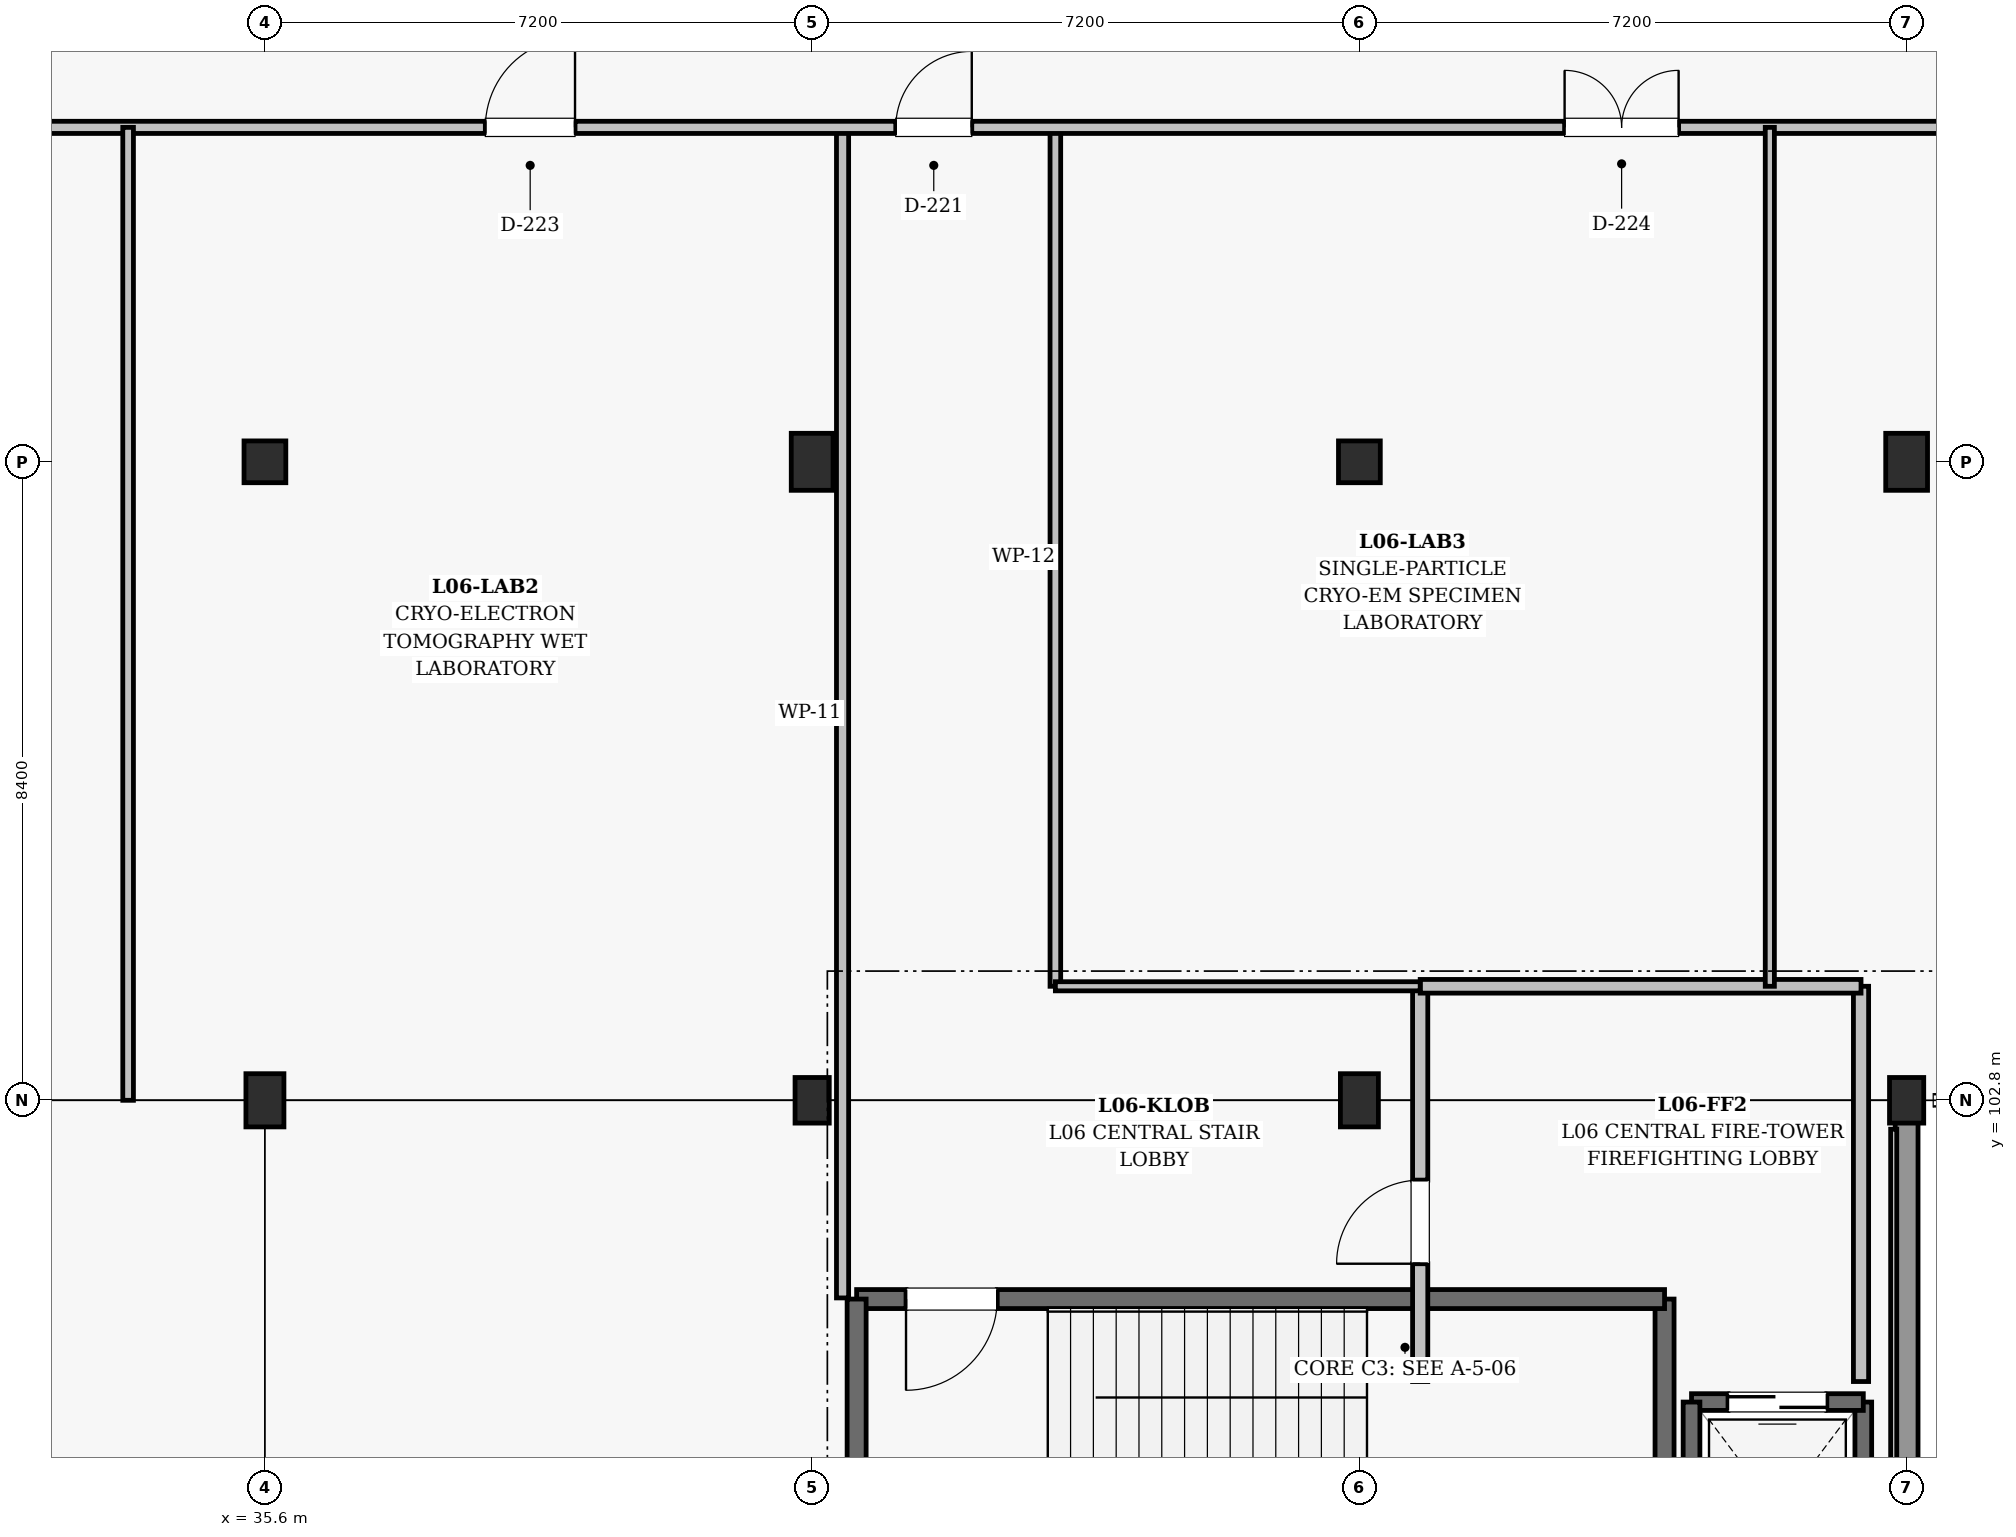
"""IFC4 building model, lengths in metres.
Left out: names, types, materials, properties, quantities, classifications, styles, units other than length and angle.
Written with IfcOpenShell. Run it as: python <this file> out.ifc"""

import sys

from ifc_helpers import new_model, si_unit, direction, frame, frame_2d, origin, origin_2d, place, context, subcontext, project, spatial, rectangle, extrude, element, fill, save


model = new_model("IFC4")
c1 = context("Model", 3, precision=1e-05, world=origin(), true_north=direction((0.0, 1.0)))
c2 = subcontext(c1, "Body", "Model", "MODEL_VIEW")
j1 = project(units=[si_unit("LENGTHUNIT", "METRE"), si_unit("PLANEANGLEUNIT", "RADIAN")], contexts=[c1])
p1 = place(None, origin())
s1 = spatial("IfcSite", under=j1, at=p1, CompositionType="ELEMENT")
p2 = place(p1, origin())
s2 = spatial("IfcBuilding", under=s1, at=p2, CompositionType="ELEMENT")
p3 = place(p2, frame((0.0, 0.0, 27.9)))
s3 = spatial("IfcBuildingStorey", under=s2, at=p3, CompositionType="ELEMENT", Elevation=27.9)
p4 = place(p3, frame((35.6, 102.8, 0.0), z_axis=(0.0, 0.0, 1.0), x_axis=(1.0, 0.0, 0.0)))
e1 = element("IfcColumn", 1, at=p4, inside=s3, PredefinedType="COLUMN", context=c2, shape_type="SweptSolid", body=[
    extrude(rectangle(XDim=0.5, YDim=0.7, at=origin_2d()), origin(), (0.0, 0.0, 1.0), 4.5),
])
p5 = place(p3, frame((35.6, 111.2, 0.0), z_axis=(0.0, 0.0, 1.0), x_axis=(1.0, 0.0, 0.0)))
e2 = element("IfcColumn", 2, at=p5, inside=s3, PredefinedType="COLUMN", context=c2, shape_type="SweptSolid", body=[
    extrude(rectangle(XDim=0.55, YDim=0.55, at=origin_2d()), origin(), (0.0, 0.0, 1.0), 4.5),
])
p6 = place(p3, frame((42.8, 102.8, 0.0), z_axis=(0.0, 0.0, 1.0), x_axis=(1.0, 0.0, 0.0)))
e3 = element("IfcColumn", 3, at=p6, inside=s3, PredefinedType="COLUMN", context=c2, shape_type="SweptSolid", body=[
    extrude(rectangle(XDim=0.45, YDim=0.6, at=origin_2d()), origin(), (0.0, 0.0, 1.0), 4.5),
])
p7 = place(p3, frame((42.8, 111.2, 0.0), z_axis=(0.0, 0.0, 1.0), x_axis=(1.0, 0.0, 0.0)))
e4 = element("IfcColumn", 4, at=p7, inside=s3, PredefinedType="COLUMN", context=c2, shape_type="SweptSolid", body=[
    extrude(rectangle(XDim=0.55, YDim=0.75, at=origin_2d()), origin(), (0.0, 0.0, 1.0), 4.5),
])
p8 = place(p3, frame((50.0, 102.8, 0.0), z_axis=(0.0, 0.0, 1.0), x_axis=(1.0, 0.0, 0.0)))
e5 = element("IfcColumn", 5, at=p8, inside=s3, PredefinedType="COLUMN", context=c2, shape_type="SweptSolid", body=[
    extrude(rectangle(XDim=0.5, YDim=0.7, at=origin_2d()), origin(), (0.0, 0.0, 1.0), 4.5),
])
p9 = place(p3, frame((50.0, 111.2, 0.0), z_axis=(0.0, 0.0, 1.0), x_axis=(1.0, 0.0, 0.0)))
e6 = element("IfcColumn", 6, at=p9, inside=s3, PredefinedType="COLUMN", context=c2, shape_type="SweptSolid", body=[
    extrude(rectangle(XDim=0.55, YDim=0.55, at=origin_2d()), origin(), (0.0, 0.0, 1.0), 4.5),
])
p10 = place(p3, frame((57.2, 102.8, 0.0), z_axis=(0.0, 0.0, 1.0), x_axis=(1.0, 0.0, 0.0)))
e7 = element("IfcColumn", 7, at=p10, inside=s3, PredefinedType="COLUMN", context=c2, shape_type="SweptSolid", body=[
    extrude(rectangle(XDim=0.45, YDim=0.6, at=origin_2d()), origin(), (0.0, 0.0, 1.0), 4.5),
])
p11 = place(p3, frame((57.2, 111.2, 0.0), z_axis=(0.0, 0.0, 1.0), x_axis=(1.0, 0.0, 0.0)))
e8 = element("IfcColumn", 8, at=p11, inside=s3, PredefinedType="COLUMN", context=c2, shape_type="SweptSolid", body=[
    extrude(rectangle(XDim=0.55, YDim=0.75, at=origin_2d()), origin(), (0.0, 0.0, 1.0), 4.5),
])
p12 = place(p3, frame((57.2, 94.655, 0.0), z_axis=(0.0, 0.0, 1.0), x_axis=(0.0, 1.0, 0.0)))
e9 = element("IfcWall", 9, at=p12, inside=s3, PredefinedType="SOLIDWALL", context=c2, shape_type="SweptSolid", body=[
    extrude(rectangle(XDim=7.865, YDim=0.3, at=frame_2d((3.933, 0.0))), origin(), (0.0, 0.0, 1.0), 3.355),
])
p13 = place(p3, frame((54.015, 95.085, 0.0), z_axis=(0.0, 0.0, 1.0), x_axis=(0.0, 1.0, 0.0)))
e10 = element("IfcWall", 10, at=p13, inside=s3, PredefinedType="SHEAR", context=c2, shape_type="SweptSolid", body=[
    extrude(rectangle(XDim=5.1, YDim=0.25, at=frame_2d((2.55, 0.0))), origin(), (0.0, 0.0, 1.0), 4.175),
])
p14 = place(p3, frame((54.015, 100.185, 0.0), z_axis=(0.0, 0.0, 1.0), x_axis=(-1.0, 0.0, 0.0)))
e11 = element("IfcWall", 11, at=p14, inside=s3, PredefinedType="SHEAR", context=c2, shape_type="SweptSolid", body=[
    extrude(rectangle(XDim=10.63, YDim=0.25, at=frame_2d((5.315, 0.0))), origin(), (0.0, 0.0, 1.0), 4.175),
])
p15 = place(p14, frame((8.78, 0.0, 0.0)))
e12 = element("IfcOpeningElement", 12, at=p15, cuts=e11, PredefinedType="OPENING", context=c2, shape_type="SweptSolid", body=[
    extrude(rectangle(XDim=1.2, YDim=2.15, at=frame_2d((0.6, 1.075))), frame((0.0, 0.135, 0.0), z_axis=(0.0, -1.0, 0.0), x_axis=(1.0, 0.0, 0.0)), (0.0, 0.0, 1.0), 0.27),
])
p16 = place(p3, frame((43.385, 100.185, 0.0), z_axis=(0.0, 0.0, 1.0), x_axis=(0.0, -1.0, 0.0)))
e13 = element("IfcWall", 13, at=p16, inside=s3, PredefinedType="SHEAR", context=c2, shape_type="SweptSolid", body=[
    extrude(rectangle(XDim=5.1, YDim=0.25, at=frame_2d((2.55, 0.0))), origin(), (0.0, 0.0, 1.0), 4.175),
])
p17 = place(p3, frame((56.63, 95.97, 0.0), z_axis=(0.0, 0.0, 1.0), x_axis=(0.0, 1.0, 0.0)))
e14 = element("IfcWall", 14, at=p17, inside=s3, PredefinedType="SHEAR", context=c2, shape_type="SweptSolid", body=[
    extrude(rectangle(XDim=2.86, YDim=0.22, at=frame_2d((1.43, 0.0))), origin(), (0.0, 0.0, 1.0), 4.175),
])
p18 = place(p3, frame((56.63, 98.83, 0.0), z_axis=(0.0, 0.0, 1.0), x_axis=(-1.0, 0.0, 0.0)))
e15 = element("IfcWall", 15, at=p18, inside=s3, PredefinedType="SHEAR", context=c2, shape_type="SweptSolid", body=[
    extrude(rectangle(XDim=2.26, YDim=0.22, at=frame_2d((1.13, 0.0))), origin(), (0.0, 0.0, 1.0), 4.175),
])
p19 = place(p18, frame((0.48, 0.0, 0.0)))
e16 = element("IfcOpeningElement", 16, at=p19, cuts=e15, PredefinedType="OPENING", context=c2, shape_type="SweptSolid", body=[
    extrude(rectangle(XDim=1.3, YDim=2.2, at=frame_2d((0.65, 1.1))), frame((0.0, 0.12, 0.0), z_axis=(0.0, -1.0, 0.0), x_axis=(1.0, 0.0, 0.0)), (0.0, 0.0, 1.0), 0.24),
])
p20 = place(p3, frame((54.37, 98.83, 0.0), z_axis=(0.0, 0.0, 1.0), x_axis=(0.0, -1.0, 0.0)))
e17 = element("IfcWall", 17, at=p20, inside=s3, PredefinedType="SHEAR", context=c2, shape_type="SweptSolid", body=[
    extrude(rectangle(XDim=2.86, YDim=0.22, at=frame_2d((1.43, 0.0))), origin(), (0.0, 0.0, 1.0), 4.175),
])
p21 = place(p3, frame((50.8, 99.1, 0.0), z_axis=(0.0, 0.0, 1.0), x_axis=(0.0, 1.0, 0.0)))
e18 = element("IfcWall", 18, at=p21, inside=s3, PredefinedType="SOLIDWALL", context=c2, shape_type="SweptSolid", body=[
    extrude(rectangle(XDim=5.2, YDim=0.2, at=frame_2d((2.6, 0.0))), origin(), (0.0, 0.0, 1.0), 3.36),
])
p22 = place(p21, frame((1.55, 0.0, 0.0)))
e19 = element("IfcOpeningElement", 19, at=p22, cuts=e18, PredefinedType="OPENING", context=c2, shape_type="SweptSolid", body=[
    extrude(rectangle(XDim=1.1, YDim=2.15, at=frame_2d((0.55, 1.075))), frame((0.0, 0.11, 0.0), z_axis=(0.0, -1.0, 0.0), x_axis=(1.0, 0.0, 0.0)), (0.0, 0.0, 1.0), 0.22),
])
p23 = place(p3, frame((56.6, 99.1, 0.0), z_axis=(0.0, 0.0, 1.0), x_axis=(0.0, 1.0, 0.0)))
e20 = element("IfcWall", 20, at=p23, inside=s3, PredefinedType="SOLIDWALL", context=c2, shape_type="SweptSolid", body=[
    extrude(rectangle(XDim=5.2, YDim=0.2, at=frame_2d((2.6, 0.0))), origin(), (0.0, 0.0, 1.0), 3.36),
])
p24 = place(p3, frame((50.8, 104.3, 0.0), z_axis=(0.0, 0.0, 1.0), x_axis=(1.0, 0.0, 0.0)))
e21 = element("IfcWall", 21, at=p24, inside=s3, PredefinedType="SOLIDWALL", context=c2, shape_type="SweptSolid", body=[
    extrude(rectangle(XDim=5.8, YDim=0.18, at=frame_2d((2.9, 0.0))), origin(), (0.0, 0.0, 1.0), 3.56),
])
p25 = place(p3, frame((43.2, 100.2, 0.0), z_axis=(0.0, 0.0, 1.0), x_axis=(0.0, 1.0, 0.0)))
e22 = element("IfcWall", 22, at=p25, inside=s3, PredefinedType="PARTITIONING", context=c2, shape_type="SweptSolid", body=[
    extrude(rectangle(XDim=15.4, YDim=0.16, at=frame_2d((7.7, 0.0))), origin(), (0.0, 0.0, 1.0), 2.96),
])
p26 = place(p3, frame((46.0, 104.3, 0.0), z_axis=(0.0, 0.0, 1.0), x_axis=(0.0, 1.0, 0.0)))
e23 = element("IfcWall", 23, at=p26, inside=s3, PredefinedType="PARTITIONING", context=c2, shape_type="SweptSolid", body=[
    extrude(rectangle(XDim=11.3, YDim=0.14, at=frame_2d((5.65, 0.0))), origin(), (0.0, 0.0, 1.0), 3.52),
])
p27 = place(p3, frame((46.0, 104.3, 0.0), z_axis=(0.0, 0.0, 1.0), x_axis=(1.0, 0.0, 0.0)))
e24 = element("IfcWall", 24, at=p27, inside=s3, PredefinedType="PARTITIONING", context=c2, shape_type="SweptSolid", body=[
    extrude(rectangle(XDim=4.8, YDim=0.12, at=frame_2d((2.4, 0.0))), origin(), (0.0, 0.0, 1.0), 3.31),
])
p28 = place(p3, frame((14.0, 115.6, 0.0), z_axis=(0.0, 0.0, 1.0), x_axis=(1.0, 0.0, 0.0)))
e25 = element("IfcWall", 25, at=p28, inside=s3, PredefinedType="PARTITIONING", context=c2, shape_type="SweptSolid", body=[
    extrude(rectangle(XDim=93.6, YDim=0.16, at=frame_2d((46.8, 0.0))), origin(), (0.0, 0.0, 1.0), 2.96),
])
p29 = place(p28, frame((29.9, 0.0, 0.0)))
e26 = element("IfcOpeningElement", 26, at=p29, cuts=e25, PredefinedType="OPENING", context=c2, shape_type="SweptSolid", body=[
    extrude(rectangle(XDim=1.0, YDim=2.15, at=frame_2d((0.5, 1.075))), frame((0.0, 0.09, 0.0), z_axis=(0.0, -1.0, 0.0), x_axis=(1.0, 0.0, 0.0)), (0.0, 0.0, 1.0), 0.18),
])
p30 = place(p28, frame((10.1, 0.0, 0.0)))
e27 = element("IfcOpeningElement", 27, at=p30, cuts=e25, PredefinedType="OPENING", context=c2, shape_type="SweptSolid", body=[
    extrude(rectangle(XDim=1.5, YDim=2.25, at=frame_2d((0.75, 1.125))), frame((0.0, 0.09, 0.0), z_axis=(0.0, -1.0, 0.0), x_axis=(1.0, 0.0, 0.0)), (0.0, 0.0, 1.0), 0.18),
])
p31 = place(p28, frame((24.5, 0.0, 0.0)))
e28 = element("IfcOpeningElement", 28, at=p31, cuts=e25, PredefinedType="OPENING", context=c2, shape_type="SweptSolid", body=[
    extrude(rectangle(XDim=1.18, YDim=2.2, at=frame_2d((0.59, 1.1))), frame((0.0, 0.09, 0.0), z_axis=(0.0, -1.0, 0.0), x_axis=(1.0, 0.0, 0.0)), (0.0, 0.0, 1.0), 0.18),
])
p32 = place(p28, frame((38.7, 0.0, 0.0)))
e29 = element("IfcOpeningElement", 29, at=p32, cuts=e25, PredefinedType="OPENING", context=c2, shape_type="SweptSolid", body=[
    extrude(rectangle(XDim=1.5, YDim=2.25, at=frame_2d((0.75, 1.125))), frame((0.0, 0.09, 0.0), z_axis=(0.0, -1.0, 0.0), x_axis=(1.0, 0.0, 0.0)), (0.0, 0.0, 1.0), 0.18),
])
p33 = place(p28, frame((52.4, 0.0, 0.0)))
e30 = element("IfcOpeningElement", 30, at=p33, cuts=e25, PredefinedType="OPENING", context=c2, shape_type="SweptSolid", body=[
    extrude(rectangle(XDim=1.5, YDim=2.25, at=frame_2d((0.75, 1.125))), frame((0.0, 0.09, 0.0), z_axis=(0.0, -1.0, 0.0), x_axis=(1.0, 0.0, 0.0)), (0.0, 0.0, 1.0), 0.18),
])
p34 = place(p28, frame((69.3, 0.0, 0.0)))
e31 = element("IfcOpeningElement", 31, at=p34, cuts=e25, PredefinedType="OPENING", context=c2, shape_type="SweptSolid", body=[
    extrude(rectangle(XDim=1.5, YDim=2.25, at=frame_2d((0.75, 1.125))), frame((0.0, 0.09, 0.0), z_axis=(0.0, -1.0, 0.0), x_axis=(1.0, 0.0, 0.0)), (0.0, 0.0, 1.0), 0.18),
])
p35 = place(p28, frame((88.2, 0.0, 0.0)))
e32 = element("IfcOpeningElement", 32, at=p35, cuts=e25, PredefinedType="OPENING", context=c2, shape_type="SweptSolid", body=[
    extrude(rectangle(XDim=1.6, YDim=2.25, at=frame_2d((0.8, 1.125))), frame((0.0, 0.09, 0.0), z_axis=(0.0, -1.0, 0.0), x_axis=(1.0, 0.0, 0.0)), (0.0, 0.0, 1.0), 0.18),
])
p36 = place(p3, frame((33.8, 102.8, 0.0), z_axis=(0.0, 0.0, 1.0), x_axis=(0.0, 1.0, 0.0)))
e33 = element("IfcWall", 33, at=p36, inside=s3, PredefinedType="PARTITIONING", context=c2, shape_type="SweptSolid", body=[
    extrude(rectangle(XDim=12.8, YDim=0.14, at=frame_2d((6.4, 0.0))), origin(), (0.0, 0.0, 1.0), 3.41),
])
p37 = place(p3, frame((55.4, 104.3, 0.0), z_axis=(0.0, 0.0, 1.0), x_axis=(0.0, 1.0, 0.0)))
e34 = element("IfcWall", 34, at=p37, inside=s3, PredefinedType="PARTITIONING", context=c2, shape_type="SweptSolid", body=[
    extrude(rectangle(XDim=11.3, YDim=0.12, at=frame_2d((5.65, 0.0))), origin(), (0.0, 0.0, 1.0), 3.44),
])
p38 = place(p15, origin())
e35 = element("IfcDoor", 35, at=p38, inside=s3, OperationType="SINGLE_SWING_RIGHT", PredefinedType="DOOR", context=c2, shape_type="SweptSolid", body=[
    extrude(rectangle(XDim=1.2, YDim=2.15, at=frame_2d((0.6, 1.075))), frame((0.0, 0.025, 0.0), z_axis=(0.0, -1.0, 0.0), x_axis=(1.0, 0.0, 0.0)), (0.0, 0.0, 1.0), 0.05),
])
fill(e12, e35)
p39 = place(p19, origin())
e36 = element("IfcDoor", 36, at=p39, inside=s3, OperationType="DOUBLE_DOOR_SLIDING", PredefinedType="DOOR", context=c2, shape_type="SweptSolid", body=[
    extrude(rectangle(XDim=1.3, YDim=2.2, at=frame_2d((0.65, 1.1))), frame((0.0, 0.025, 0.0), z_axis=(0.0, -1.0, 0.0), x_axis=(1.0, 0.0, 0.0)), (0.0, 0.0, 1.0), 0.05),
])
fill(e16, e36)
p40 = place(p22, origin())
e37 = element("IfcDoor", 37, at=p40, inside=s3, OperationType="SINGLE_SWING_LEFT", PredefinedType="DOOR", context=c2, shape_type="SweptSolid", body=[
    extrude(rectangle(XDim=1.1, YDim=2.15, at=frame_2d((0.55, 1.075))), frame((0.0, 0.025, 0.0), z_axis=(0.0, -1.0, 0.0), x_axis=(1.0, 0.0, 0.0)), (0.0, 0.0, 1.0), 0.05),
])
fill(e19, e37)
p41 = place(p29, origin())
e38 = element("IfcDoor", 38, at=p41, inside=s3, OperationType="SINGLE_SWING_RIGHT", PredefinedType="DOOR", context=c2, shape_type="SweptSolid", body=[
    extrude(rectangle(XDim=1.0, YDim=2.15, at=frame_2d((0.5, 1.075))), frame((0.0, 0.025, 0.0), z_axis=(0.0, -1.0, 0.0), x_axis=(1.0, 0.0, 0.0)), (0.0, 0.0, 1.0), 0.05),
])
fill(e26, e38)
p42 = place(p31, origin())
e39 = element("IfcDoor", 39, at=p42, inside=s3, OperationType="SINGLE_SWING_RIGHT", PredefinedType="DOOR", context=c2, shape_type="SweptSolid", body=[
    extrude(rectangle(XDim=1.18, YDim=2.2, at=frame_2d((0.59, 1.1))), frame((0.0, 0.025, 0.0), z_axis=(0.0, -1.0, 0.0), x_axis=(1.0, 0.0, 0.0)), (0.0, 0.0, 1.0), 0.05),
])
fill(e28, e39)
p43 = place(p32, origin())
e40 = element("IfcDoor", 40, at=p43, inside=s3, OperationType="DOUBLE_DOOR_SINGLE_SWING", PredefinedType="DOOR", context=c2, shape_type="SweptSolid", body=[
    extrude(rectangle(XDim=1.5, YDim=2.25, at=frame_2d((0.75, 1.125))), frame((0.0, 0.025, 0.0), z_axis=(0.0, -1.0, 0.0), x_axis=(1.0, 0.0, 0.0)), (0.0, 0.0, 1.0), 0.05),
])
fill(e29, e40)
save(model, sys.argv[1])
